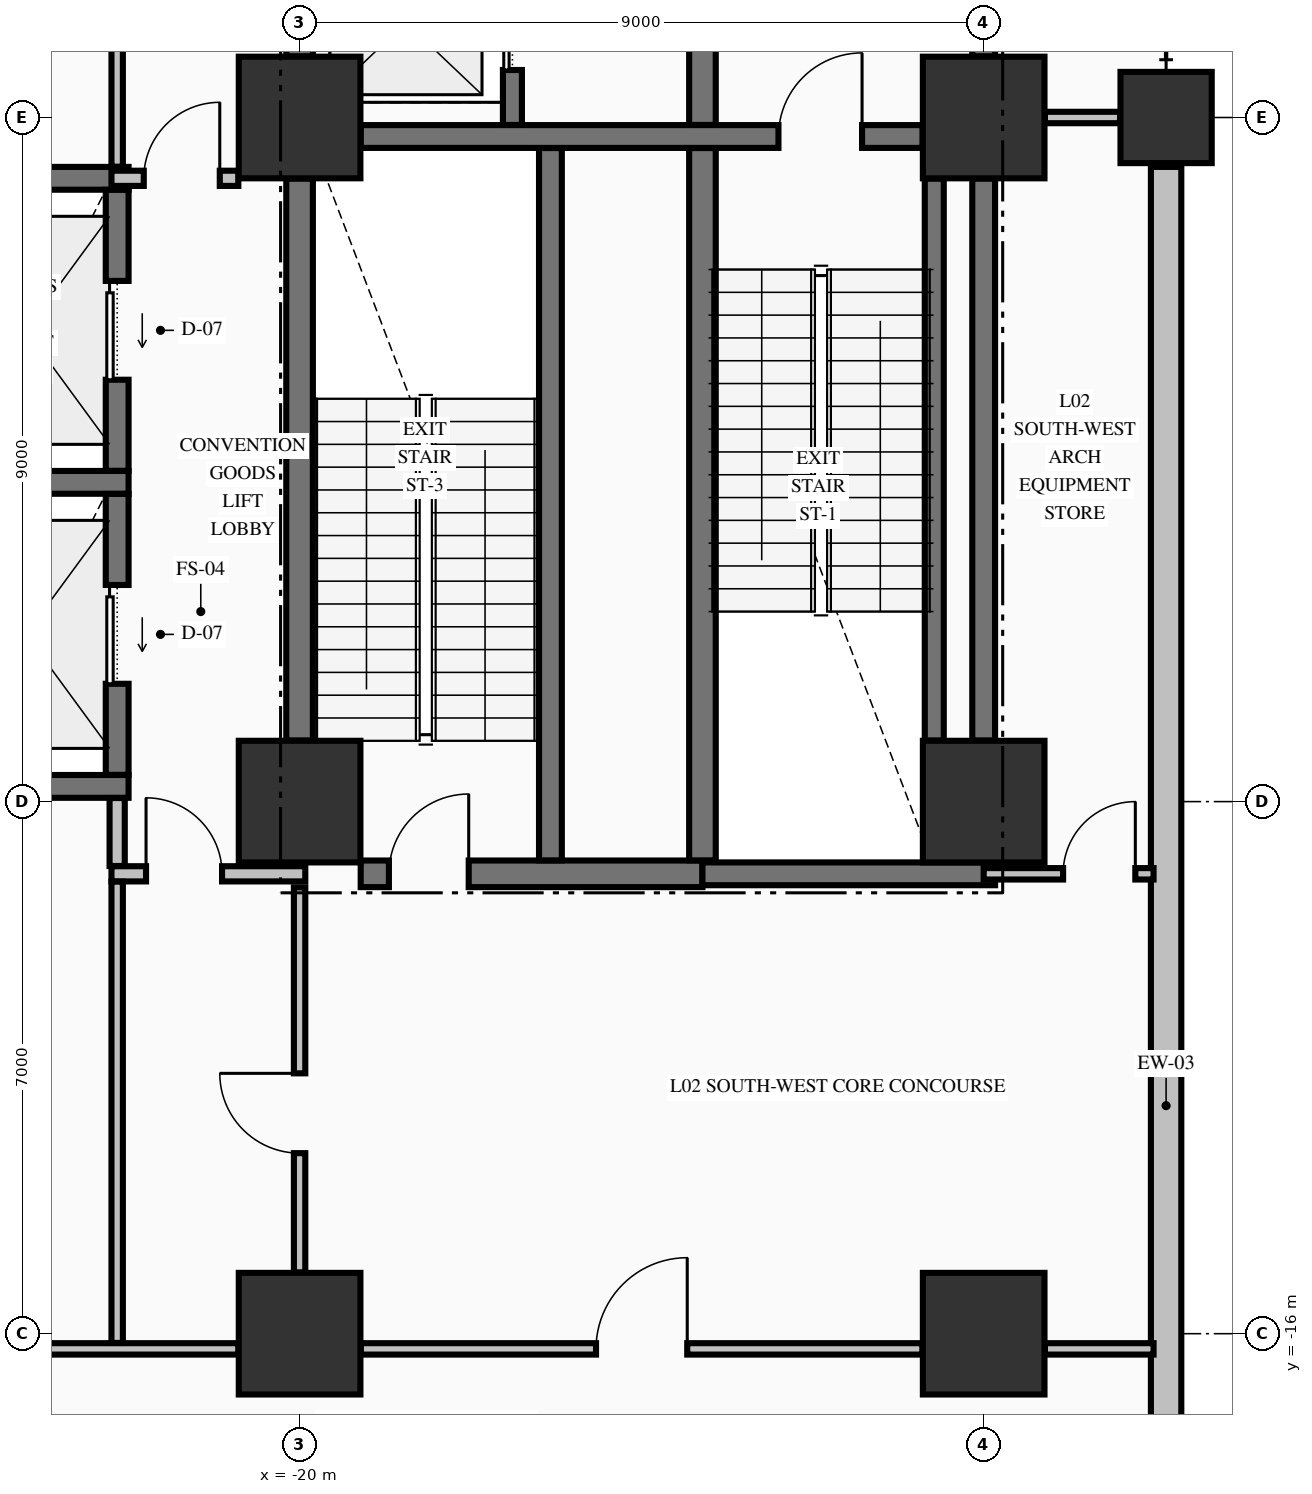
"""IFC4 building model, lengths in metres.
Left out: names, types, materials, properties, quantities, classifications, styles, units other than length and angle.
Written with IfcOpenShell. Run it as: python <this file> out.ifc"""

import sys

from ifc_helpers import new_model, si_unit, direction, frame, frame_2d, origin, origin_2d, place, context, subcontext, project, spatial, rectangle, extrude, element, fill, save


model = new_model("IFC4")
c1 = context("Model", 3, precision=1e-05, world=origin(), true_north=direction((0.0, 1.0)))
c2 = subcontext(c1, "Body", "Model", "MODEL_VIEW")
j1 = project(units=[si_unit("LENGTHUNIT", "METRE"), si_unit("PLANEANGLEUNIT", "RADIAN")], contexts=[c1])
p1 = place(None, origin())
s1 = spatial("IfcSite", under=j1, at=p1, CompositionType="ELEMENT")
p2 = place(p1, origin())
s2 = spatial("IfcBuilding", under=s1, at=p2, CompositionType="ELEMENT")
p3 = place(p2, frame((0.0, 0.0, 10.88)))
s3 = spatial("IfcBuildingStorey", under=s2, at=p3, CompositionType="ELEMENT", Elevation=10.88)
for number, where, z_axis, x_axis in (
    (1, (-20.0, -16.0, 0.0), (0.0, 0.0, 1.0), (1.0, 0.0, 0.0)),
    (2, (-20.0, -9.0, 0.0), (0.0, 0.0, 1.0), (1.0, 0.0, 0.0)),
    (3, (-20.0, 0.0, 0.0), (0.0, 0.0, 1.0), (1.0, 0.0, 0.0)),
    (4, (-11.0, -16.0, 0.0), (0.0, 0.0, 1.0), (1.0, 0.0, 0.0)),
    (5, (-11.0, -9.0, 0.0), (0.0, 0.0, 1.0), (1.0, 0.0, 0.0)),
    (6, (-11.0, 0.0, 0.0), (0.0, 0.0, 1.0), (1.0, 0.0, 0.0)),
):
    element("IfcColumn", number, at=place(p3, frame(where, z_axis=z_axis, x_axis=x_axis)), inside=s3, PredefinedType="COLUMN", context=c2, shape_type="SweptSolid", body=[
        extrude(rectangle(XDim=1.6, YDim=1.6, at=origin_2d()), origin(), (0.0, 0.0, 1.0), 5.09),
    ])
p4 = place(p3, frame((-8.6, 0.0, 0.0), z_axis=(0.0, 0.0, 1.0), x_axis=(1.0, 0.0, 0.0)))
e7 = element("IfcColumn", 7, at=p4, inside=s3, PredefinedType="COLUMN", context=c2, shape_type="SweptSolid", body=[
    extrude(rectangle(XDim=1.2, YDim=1.2, at=origin_2d()), origin(), (0.0, 0.0, 1.0), 5.09),
])
p5 = place(p3, frame((-8.6, -25.37, 0.0), z_axis=(0.0, 0.0, 1.0), x_axis=(0.0, 1.0, 0.0)))
e8 = element("IfcWall", 8, at=p5, inside=s3, PredefinedType="STANDARD", context=c2, shape_type="SweptSolid", body=[
    extrude(rectangle(XDim=24.72, YDim=0.4, at=frame_2d((12.36, 0.0))), origin(), (0.0, 0.0, 1.0), 4.132),
])
p6 = place(p3, frame((-19.196, -9.95, 0.0), z_axis=(0.0, 0.0, 1.0), x_axis=(1.0, 0.0, 0.0)))
e9 = element("IfcWall", 9, at=p6, inside=s3, PredefinedType="SHEAR", context=c2, shape_type="SweptSolid", body=[
    extrude(rectangle(XDim=4.496, YDim=0.35, at=frame_2d((2.248, 0.0))), origin(), (0.0, 0.0, 1.0), 5.09),
])
p7 = place(p6, frame((0.371, 0.0, 0.0)))
e10 = element("IfcOpeningElement", 10, at=p7, cuts=e9, PredefinedType="OPENING", context=c2, shape_type="SweptSolid", body=[
    extrude(rectangle(XDim=1.05, YDim=2.15, at=frame_2d((0.525, 1.075))), frame((0.0, 0.185, 0.0), z_axis=(0.0, -1.0, 0.0), x_axis=(1.0, 0.0, 0.0)), (0.0, 0.0, 1.0), 0.37),
])
p8 = place(p3, frame((-14.7, -9.95, 0.0), z_axis=(0.0, 0.0, 1.0), x_axis=(1.0, 0.0, 0.0)))
e11 = element("IfcWall", 11, at=p8, inside=s3, PredefinedType="SHEAR", context=c2, shape_type="SweptSolid", body=[
    extrude(rectangle(XDim=3.85, YDim=0.3, at=frame_2d((1.925, 0.0))), origin(), (0.0, 0.0, 1.0), 5.09),
])
p9 = place(p3, frame((-25.296, -8.8, 0.0), z_axis=(0.0, 0.0, 1.0), x_axis=(1.0, 0.0, 0.0)))
e12 = element("IfcWall", 12, at=p9, inside=s3, PredefinedType="SHEAR", context=c2, shape_type="SweptSolid", body=[
    extrude(rectangle(XDim=3.046, YDim=0.3, at=frame_2d((1.523, 0.0))), origin(), (0.0, 0.0, 1.0), 5.09),
])
p10 = place(p3, frame((-25.0, -4.8, 0.0), z_axis=(0.0, 0.0, 1.0), x_axis=(1.0, 0.0, 0.0)))
e13 = element("IfcWall", 13, at=p10, inside=s3, PredefinedType="SHEAR", context=c2, shape_type="SweptSolid", body=[
    extrude(rectangle(XDim=2.75, YDim=0.3, at=frame_2d((1.375, 0.0))), origin(), (0.0, 0.0, 1.0), 5.09),
])
p11 = place(p3, frame((-25.296, -0.8, 0.0), z_axis=(0.0, 0.0, 1.0), x_axis=(1.0, 0.0, 0.0)))
e14 = element("IfcWall", 14, at=p11, inside=s3, PredefinedType="SHEAR", context=c2, shape_type="SweptSolid", body=[
    extrude(rectangle(XDim=3.046, YDim=0.3, at=frame_2d((1.523, 0.0))), origin(), (0.0, 0.0, 1.0), 5.09),
])
p12 = place(p3, frame((-19.196, -0.25, 0.0), z_axis=(0.0, 0.0, 1.0), x_axis=(1.0, 0.0, 0.0)))
e15 = element("IfcWall", 15, at=p12, inside=s3, PredefinedType="SHEAR", context=c2, shape_type="SweptSolid", body=[
    extrude(rectangle(XDim=7.392, YDim=0.3, at=frame_2d((3.696, 0.0))), origin(), (0.0, 0.0, 1.0), 5.09),
])
p13 = place(p12, frame((5.496, 0.0, 0.0)))
e16 = element("IfcOpeningElement", 16, at=p13, cuts=e15, PredefinedType="OPENING", context=c2, shape_type="SweptSolid", body=[
    extrude(rectangle(XDim=1.1, YDim=2.15, at=frame_2d((0.55, 1.075))), frame((0.0, 0.16, 0.0), z_axis=(0.0, -1.0, 0.0), x_axis=(1.0, 0.0, 0.0)), (0.0, 0.0, 1.0), 0.32),
])
p14 = place(p3, frame((-25.294, -16.2, 0.0), z_axis=(0.0, 0.0, 1.0), x_axis=(1.0, 0.0, 0.0)))
e17 = element("IfcWall", 17, at=p14, inside=s3, PredefinedType="PARTITIONING", context=c2, shape_type="SweptSolid", body=[
    extrude(rectangle(XDim=4.488, YDim=0.15, at=frame_2d((2.244, 0.0))), origin(), (0.0, 0.0, 1.0), 4.132),
])
p15 = place(p14, frame((0.619, 0.0, 0.0)))
e18 = element("IfcOpeningElement", 18, at=p15, cuts=e17, PredefinedType="OPENING", context=c2, shape_type="SweptSolid", body=[
    extrude(rectangle(XDim=0.95, YDim=2.15, at=frame_2d((0.475, 1.075))), frame((0.0, 0.085, 0.0), z_axis=(0.0, -1.0, 0.0), x_axis=(1.0, 0.0, 0.0)), (0.0, 0.0, 1.0), 0.17),
])
p16 = place(p3, frame((-19.194, -16.2, 0.0), z_axis=(0.0, 0.0, 1.0), x_axis=(1.0, 0.0, 0.0)))
e19 = element("IfcWall", 19, at=p16, inside=s3, PredefinedType="PARTITIONING", context=c2, shape_type="SweptSolid", body=[
    extrude(rectangle(XDim=7.388, YDim=0.15, at=frame_2d((3.694, 0.0))), origin(), (0.0, 0.0, 1.0), 4.132),
])
p17 = place(p16, frame((3.094, 0.0, 0.0)))
e20 = element("IfcOpeningElement", 20, at=p17, cuts=e19, PredefinedType="OPENING", context=c2, shape_type="SweptSolid", body=[
    extrude(rectangle(XDim=1.2, YDim=2.15, at=frame_2d((0.6, 1.075))), frame((0.0, 0.085, 0.0), z_axis=(0.0, -1.0, 0.0), x_axis=(1.0, 0.0, 0.0)), (0.0, 0.0, 1.0), 0.17),
])
p18 = place(p3, frame((-10.194, -16.2, 0.0), z_axis=(0.0, 0.0, 1.0), x_axis=(1.0, 0.0, 0.0)))
e21 = element("IfcWall", 21, at=p18, inside=s3, PredefinedType="PARTITIONING", context=c2, shape_type="SweptSolid", body=[
    extrude(rectangle(XDim=1.429, YDim=0.15, at=frame_2d((0.715, 0.0))), origin(), (0.0, 0.0, 1.0), 5.09),
])
p19 = place(p3, frame((-22.475, -9.95, 0.0), z_axis=(0.0, 0.0, 1.0), x_axis=(1.0, 0.0, 0.0)))
e22 = element("IfcWall", 22, at=p19, inside=s3, PredefinedType="PARTITIONING", context=c2, shape_type="SweptSolid", body=[
    extrude(rectangle(XDim=2.55, YDim=0.2, at=frame_2d((1.275, 0.0))), origin(), (0.0, 0.0, 1.0), 5.09),
])
p20 = place(p19, frame((0.455, 0.0, 0.0)))
e23 = element("IfcOpeningElement", 23, at=p20, cuts=e22, PredefinedType="OPENING", context=c2, shape_type="SweptSolid", body=[
    extrude(rectangle(XDim=1.0, YDim=2.15, at=frame_2d((0.5, 1.075))), frame((0.0, 0.11, 0.0), z_axis=(0.0, -1.0, 0.0), x_axis=(1.0, 0.0, 0.0)), (0.0, 0.0, 1.0), 0.22),
])
p21 = place(p3, frame((-11.0, -9.95, 0.0), z_axis=(0.0, 0.0, 1.0), x_axis=(1.0, 0.0, 0.0)))
e24 = element("IfcWall", 24, at=p21, inside=s3, PredefinedType="PARTITIONING", context=c2, shape_type="SweptSolid", body=[
    extrude(rectangle(XDim=2.235, YDim=0.15, at=frame_2d((1.118, 0.0))), origin(), (0.0, 0.0, 1.0), 5.09),
])
p22 = place(p21, frame((1.045, 0.0, 0.0)))
e25 = element("IfcOpeningElement", 25, at=p22, cuts=e24, PredefinedType="OPENING", context=c2, shape_type="SweptSolid", body=[
    extrude(rectangle(XDim=0.95, YDim=2.15, at=frame_2d((0.475, 1.075))), frame((0.0, 0.085, 0.0), z_axis=(0.0, -1.0, 0.0), x_axis=(1.0, 0.0, 0.0)), (0.0, 0.0, 1.0), 0.17),
])
p23 = place(p3, frame((-22.475, -0.8, 0.0), z_axis=(0.0, 0.0, 1.0), x_axis=(1.0, 0.0, 0.0)))
e26 = element("IfcWall", 26, at=p23, inside=s3, PredefinedType="PARTITIONING", context=c2, shape_type="SweptSolid", body=[
    extrude(rectangle(XDim=1.669, YDim=0.2, at=frame_2d((0.834, 0.0))), origin(), (0.0, 0.0, 1.0), 5.09),
])
p24 = place(p23, frame((0.425, 0.0, 0.0)))
e27 = element("IfcOpeningElement", 27, at=p24, cuts=e26, PredefinedType="OPENING", context=c2, shape_type="SweptSolid", body=[
    extrude(rectangle(XDim=1.0, YDim=2.15, at=frame_2d((0.5, 1.075))), frame((0.0, 0.11, 0.0), z_axis=(0.0, -1.0, 0.0), x_axis=(1.0, 0.0, 0.0)), (0.0, 0.0, 1.0), 0.22),
])
p25 = place(p3, frame((-10.194, 0.0, 0.0), z_axis=(0.0, 0.0, 1.0), x_axis=(1.0, 0.0, 0.0)))
e28 = element("IfcWall", 28, at=p25, inside=s3, PredefinedType="PARTITIONING", context=c2, shape_type="SweptSolid", body=[
    extrude(rectangle(XDim=0.988, YDim=0.15, at=frame_2d((0.494, 0.0))), origin(), (0.0, 0.0, 1.0), 4.132),
])
p26 = place(p3, frame((-22.4, -8.648, 0.0), z_axis=(0.0, 0.0, 1.0), x_axis=(0.0, 1.0, 0.0)))
e29 = element("IfcWall", 29, at=p26, inside=s3, PredefinedType="SHEAR", context=c2, shape_type="SweptSolid", body=[
    extrude(rectangle(XDim=3.696, YDim=0.3, at=frame_2d((1.848, 0.0))), origin(), (0.0, 0.0, 1.0), 5.09),
])
p27 = place(p26, frame((1.198, 0.0, 0.0)))
e30 = element("IfcOpeningElement", 30, at=p27, cuts=e29, PredefinedType="OPENING", context=c2, shape_type="SweptSolid", body=[
    extrude(rectangle(XDim=1.3, YDim=2.3, at=frame_2d((0.65, 1.15))), frame((0.0, 0.16, 0.0), z_axis=(0.0, -1.0, 0.0), x_axis=(1.0, 0.0, 0.0)), (0.0, 0.0, 1.0), 0.32),
])
p28 = place(p3, frame((-22.4, -4.648, 0.0), z_axis=(0.0, 0.0, 1.0), x_axis=(0.0, 1.0, 0.0)))
e31 = element("IfcWall", 31, at=p28, inside=s3, PredefinedType="SHEAR", context=c2, shape_type="SweptSolid", body=[
    extrude(rectangle(XDim=3.696, YDim=0.3, at=frame_2d((1.848, 0.0))), origin(), (0.0, 0.0, 1.0), 5.09),
])
p29 = place(p28, frame((1.198, 0.0, 0.0)))
e32 = element("IfcOpeningElement", 32, at=p29, cuts=e31, PredefinedType="OPENING", context=c2, shape_type="SweptSolid", body=[
    extrude(rectangle(XDim=1.3, YDim=2.3, at=frame_2d((0.65, 1.15))), frame((0.0, 0.16, 0.0), z_axis=(0.0, -1.0, 0.0), x_axis=(1.0, 0.0, 0.0)), (0.0, 0.0, 1.0), 0.32),
])
p30 = place(p3, frame((-20.0, -8.196, 0.0), z_axis=(0.0, 0.0, 1.0), x_axis=(0.0, 1.0, 0.0)))
e33 = element("IfcWall", 33, at=p30, inside=s3, PredefinedType="SHEAR", context=c2, shape_type="SweptSolid", body=[
    extrude(rectangle(XDim=7.392, YDim=0.35, at=frame_2d((3.696, 0.0))), origin(), (0.0, 0.0, 1.0), 5.09),
])
p31 = place(p3, frame((-20.0, 0.804, 0.0), z_axis=(0.0, 0.0, 1.0), x_axis=(0.0, 1.0, 0.0)))
e34 = element("IfcWall", 34, at=p31, inside=s3, PredefinedType="SHEAR", context=c2, shape_type="SweptSolid", body=[
    extrude(rectangle(XDim=1.669, YDim=0.35, at=frame_2d((0.834, 0.0))), origin(), (0.0, 0.0, 1.0), 5.09),
])
p32 = place(p3, frame((-17.2, -0.098, 0.0), z_axis=(0.0, 0.0, 1.0), x_axis=(0.0, 1.0, 0.0)))
e35 = element("IfcWall", 35, at=p32, inside=s3, PredefinedType="SOLIDWALL", context=c2, shape_type="SweptSolid", body=[
    extrude(rectangle(XDim=2.571, YDim=0.25, at=frame_2d((1.285, 0.0))), origin(), (0.0, 0.0, 1.0), 5.09),
])
p33 = place(p32, frame((0.723, 0.0, 0.0)))
e36 = element("IfcOpeningElement", 36, at=p33, cuts=e35, PredefinedType="OPENING", context=c2, shape_type="SweptSolid", body=[
    extrude(rectangle(XDim=1.1, YDim=2.2, at=frame_2d((0.55, 1.1))), frame((0.0, 0.135, 0.0), z_axis=(0.0, -1.0, 0.0), x_axis=(1.0, 0.0, 0.0)), (0.0, 0.0, 1.0), 0.27),
])
p34 = place(p3, frame((-16.7, -9.773, 0.0), z_axis=(0.0, 0.0, 1.0), x_axis=(0.0, 1.0, 0.0)))
e37 = element("IfcWall", 37, at=p34, inside=s3, PredefinedType="SHEAR", context=c2, shape_type="SweptSolid", body=[
    extrude(rectangle(XDim=9.371, YDim=0.3, at=frame_2d((4.686, 0.0))), origin(), (0.0, 0.0, 1.0), 5.09),
])
p35 = place(p3, frame((-14.7, -9.773, 0.0), z_axis=(0.0, 0.0, 1.0), x_axis=(0.0, 1.0, 0.0)))
e38 = element("IfcWall", 38, at=p35, inside=s3, PredefinedType="SHEAR", context=c2, shape_type="SweptSolid", body=[
    extrude(rectangle(XDim=9.371, YDim=0.35, at=frame_2d((4.686, 0.0))), origin(), (0.0, 0.0, 1.0), 5.09),
])
p36 = place(p3, frame((-14.7, -0.098, 0.0), z_axis=(0.0, 0.0, 1.0), x_axis=(0.0, 1.0, 0.0)))
e39 = element("IfcWall", 39, at=p36, inside=s3, PredefinedType="SHEAR", context=c2, shape_type="SweptSolid", body=[
    extrude(rectangle(XDim=2.846, YDim=0.35, at=frame_2d((1.423, 0.0))), origin(), (0.0, 0.0, 1.0), 5.09),
])
p37 = place(p3, frame((-11.65, -8.196, 0.0), z_axis=(0.0, 0.0, 1.0), x_axis=(0.0, 1.0, 0.0)))
e40 = element("IfcWall", 40, at=p37, inside=s3, PredefinedType="SOLIDWALL", context=c2, shape_type="SweptSolid", body=[
    extrude(rectangle(XDim=7.392, YDim=0.25, at=frame_2d((3.696, 0.0))), origin(), (0.0, 0.0, 1.0), 5.09),
])
p38 = place(p3, frame((-11.0, -8.196, 0.0), z_axis=(0.0, 0.0, 1.0), x_axis=(0.0, 1.0, 0.0)))
e41 = element("IfcWall", 41, at=p38, inside=s3, PredefinedType="SHEAR", context=c2, shape_type="SweptSolid", body=[
    extrude(rectangle(XDim=7.392, YDim=0.3, at=frame_2d((3.696, 0.0))), origin(), (0.0, 0.0, 1.0), 5.09),
])
p39 = place(p3, frame((-11.0, 0.804, 0.0), z_axis=(0.0, 0.0, 1.0), x_axis=(0.0, 1.0, 0.0)))
e42 = element("IfcWall", 42, at=p39, inside=s3, PredefinedType="SHEAR", context=c2, shape_type="SweptSolid", body=[
    extrude(rectangle(XDim=1.944, YDim=0.3, at=frame_2d((0.972, 0.0))), origin(), (0.0, 0.0, 1.0), 5.09),
])
p40 = place(p39, frame((0.296, 0.0, 0.0)))
e43 = element("IfcOpeningElement", 43, at=p40, cuts=e42, PredefinedType="OPENING", context=c2, shape_type="SweptSolid", body=[
    extrude(rectangle(XDim=1.1, YDim=2.15, at=frame_2d((0.55, 1.075))), frame((0.0, 0.16, 0.0), z_axis=(0.0, -1.0, 0.0), x_axis=(1.0, 0.0, 0.0)), (0.0, 0.0, 1.0), 0.32),
])
p41 = place(p3, frame((-22.4, -16.122, 0.0), z_axis=(0.0, 0.0, 1.0), x_axis=(0.0, 1.0, 0.0)))
e44 = element("IfcWall", 44, at=p41, inside=s3, PredefinedType="PARTITIONING", context=c2, shape_type="SweptSolid", body=[
    extrude(rectangle(XDim=6.069, YDim=0.15, at=frame_2d((3.035, 0.0))), origin(), (0.0, 0.0, 1.0), 5.09),
])
p42 = place(p3, frame((-22.4, -9.847, 0.0), z_axis=(0.0, 0.0, 1.0), x_axis=(0.0, 1.0, 0.0)))
e45 = element("IfcWall", 45, at=p42, inside=s3, PredefinedType="PARTITIONING", context=c2, shape_type="SweptSolid", body=[
    extrude(rectangle(XDim=0.894, YDim=0.2, at=frame_2d((0.447, 0.0))), origin(), (0.0, 0.0, 1.0), 5.09),
])
p43 = place(p3, frame((-22.4, -0.647, 0.0), z_axis=(0.0, 0.0, 1.0), x_axis=(0.0, 1.0, 0.0)))
e46 = element("IfcWall", 46, at=p43, inside=s3, PredefinedType="PARTITIONING", context=c2, shape_type="SweptSolid", body=[
    extrude(rectangle(XDim=16.569, YDim=0.15, at=frame_2d((8.285, 0.0))), origin(), (0.0, 0.0, 1.0), 5.09),
])
p44 = place(p43, frame((6.597, 0.0, 0.0)))
e47 = element("IfcOpeningElement", 47, at=p44, cuts=e46, PredefinedType="OPENING", context=c2, shape_type="SweptSolid", body=[
    extrude(rectangle(XDim=1.1, YDim=2.15, at=frame_2d((0.55, 1.075))), frame((0.0, 0.085, 0.0), z_axis=(0.0, -1.0, 0.0), x_axis=(1.0, 0.0, 0.0)), (0.0, 0.0, 1.0), 0.17),
])
p45 = place(p3, frame((-20.0, -15.194, 0.0), z_axis=(0.0, 0.0, 1.0), x_axis=(0.0, 1.0, 0.0)))
e48 = element("IfcWall", 48, at=p45, inside=s3, PredefinedType="PARTITIONING", context=c2, shape_type="SweptSolid", body=[
    extrude(rectangle(XDim=5.066, YDim=0.15, at=frame_2d((2.533, 0.0))), origin(), (0.0, 0.0, 1.0), 5.09),
])
p46 = place(p45, frame((1.569, 0.0, 0.0)))
e49 = element("IfcOpeningElement", 49, at=p46, cuts=e48, PredefinedType="OPENING", context=c2, shape_type="SweptSolid", body=[
    extrude(rectangle(XDim=1.05, YDim=2.15, at=frame_2d((0.525, 1.075))), frame((0.0, 0.085, 0.0), z_axis=(0.0, -1.0, 0.0), x_axis=(1.0, 0.0, 0.0)), (0.0, 0.0, 1.0), 0.17),
])
p47 = place(p13, origin())
e50 = element("IfcDoor", 50, at=p47, inside=s3, OperationType="SINGLE_SWING_RIGHT", PredefinedType="DOOR", context=c2, shape_type="SweptSolid", body=[
    extrude(rectangle(XDim=1.1, YDim=2.15, at=frame_2d((0.55, 1.075))), frame((0.0, 0.025, 0.0), z_axis=(0.0, -1.0, 0.0), x_axis=(1.0, 0.0, 0.0)), (0.0, 0.0, 1.0), 0.05),
])
fill(e16, e50)
p48 = place(p7, origin())
e51 = element("IfcDoor", 51, at=p48, inside=s3, OperationType="SINGLE_SWING_RIGHT", PredefinedType="DOOR", context=c2, shape_type="SweptSolid", body=[
    extrude(rectangle(XDim=1.05, YDim=2.15, at=frame_2d((0.525, 1.075))), frame((0.0, 0.025, 0.0), z_axis=(0.0, -1.0, 0.0), x_axis=(1.0, 0.0, 0.0)), (0.0, 0.0, 1.0), 0.05),
])
fill(e10, e51)
p49 = place(p33, origin())
e52 = element("IfcDoor", 52, at=p49, inside=s3, OperationType="SLIDING_TO_LEFT", PredefinedType="DOOR", context=c2, shape_type="SweptSolid", body=[
    extrude(rectangle(XDim=1.1, YDim=2.2, at=frame_2d((0.55, 1.1))), frame((0.0, 0.025, 0.0), z_axis=(0.0, -1.0, 0.0), x_axis=(1.0, 0.0, 0.0)), (0.0, 0.0, 1.0), 0.05),
])
fill(e36, e52)
p50 = place(p27, origin())
e53 = element("IfcDoor", 53, at=p50, inside=s3, OperationType="SLIDING_TO_LEFT", PredefinedType="DOOR", context=c2, shape_type="SweptSolid", body=[
    extrude(rectangle(XDim=1.3, YDim=2.3, at=frame_2d((0.65, 1.15))), frame((0.0, 0.025, 0.0), z_axis=(0.0, -1.0, 0.0), x_axis=(1.0, 0.0, 0.0)), (0.0, 0.0, 1.0), 0.05),
])
fill(e30, e53)
p51 = place(p29, origin())
e54 = element("IfcDoor", 54, at=p51, inside=s3, OperationType="SLIDING_TO_LEFT", PredefinedType="DOOR", context=c2, shape_type="SweptSolid", body=[
    extrude(rectangle(XDim=1.3, YDim=2.3, at=frame_2d((0.65, 1.15))), frame((0.0, 0.025, 0.0), z_axis=(0.0, -1.0, 0.0), x_axis=(1.0, 0.0, 0.0)), (0.0, 0.0, 1.0), 0.05),
])
fill(e32, e54)
p52 = place(p24, origin())
e55 = element("IfcDoor", 55, at=p52, inside=s3, OperationType="SINGLE_SWING_RIGHT", PredefinedType="DOOR", context=c2, shape_type="SweptSolid", body=[
    extrude(rectangle(XDim=1.0, YDim=2.15, at=frame_2d((0.5, 1.075))), frame((0.0, 0.025, 0.0), z_axis=(0.0, -1.0, 0.0), x_axis=(1.0, 0.0, 0.0)), (0.0, 0.0, 1.0), 0.05),
])
fill(e27, e55)
p53 = place(p22, origin())
e56 = element("IfcDoor", 56, at=p53, inside=s3, OperationType="SINGLE_SWING_RIGHT", PredefinedType="DOOR", context=c2, shape_type="SweptSolid", body=[
    extrude(rectangle(XDim=0.95, YDim=2.15, at=frame_2d((0.475, 1.075))), frame((0.0, 0.025, 0.0), z_axis=(0.0, -1.0, 0.0), x_axis=(1.0, 0.0, 0.0)), (0.0, 0.0, 1.0), 0.05),
])
fill(e25, e56)
p54 = place(p20, origin())
e57 = element("IfcDoor", 57, at=p54, inside=s3, OperationType="SINGLE_SWING_LEFT", PredefinedType="DOOR", context=c2, shape_type="SweptSolid", body=[
    extrude(rectangle(XDim=1.0, YDim=2.15, at=frame_2d((0.5, 1.075))), frame((0.0, 0.025, 0.0), z_axis=(0.0, -1.0, 0.0), x_axis=(1.0, 0.0, 0.0)), (0.0, 0.0, 1.0), 0.05),
])
fill(e23, e57)
p55 = place(p46, origin())
e58 = element("IfcDoor", 58, at=p55, inside=s3, OperationType="SINGLE_SWING_RIGHT", PredefinedType="DOOR", context=c2, shape_type="SweptSolid", body=[
    extrude(rectangle(XDim=1.05, YDim=2.15, at=frame_2d((0.525, 1.075))), frame((0.0, 0.025, 0.0), z_axis=(0.0, -1.0, 0.0), x_axis=(1.0, 0.0, 0.0)), (0.0, 0.0, 1.0), 0.05),
])
fill(e49, e58)
p56 = place(p17, origin())
e59 = element("IfcDoor", 59, at=p56, inside=s3, OperationType="SINGLE_SWING_RIGHT", PredefinedType="DOOR", context=c2, shape_type="SweptSolid", body=[
    extrude(rectangle(XDim=1.2, YDim=2.15, at=frame_2d((0.6, 1.075))), frame((0.0, 0.025, 0.0), z_axis=(0.0, -1.0, 0.0), x_axis=(1.0, 0.0, 0.0)), (0.0, 0.0, 1.0), 0.05),
])
fill(e20, e59)
save(model, sys.argv[1])
